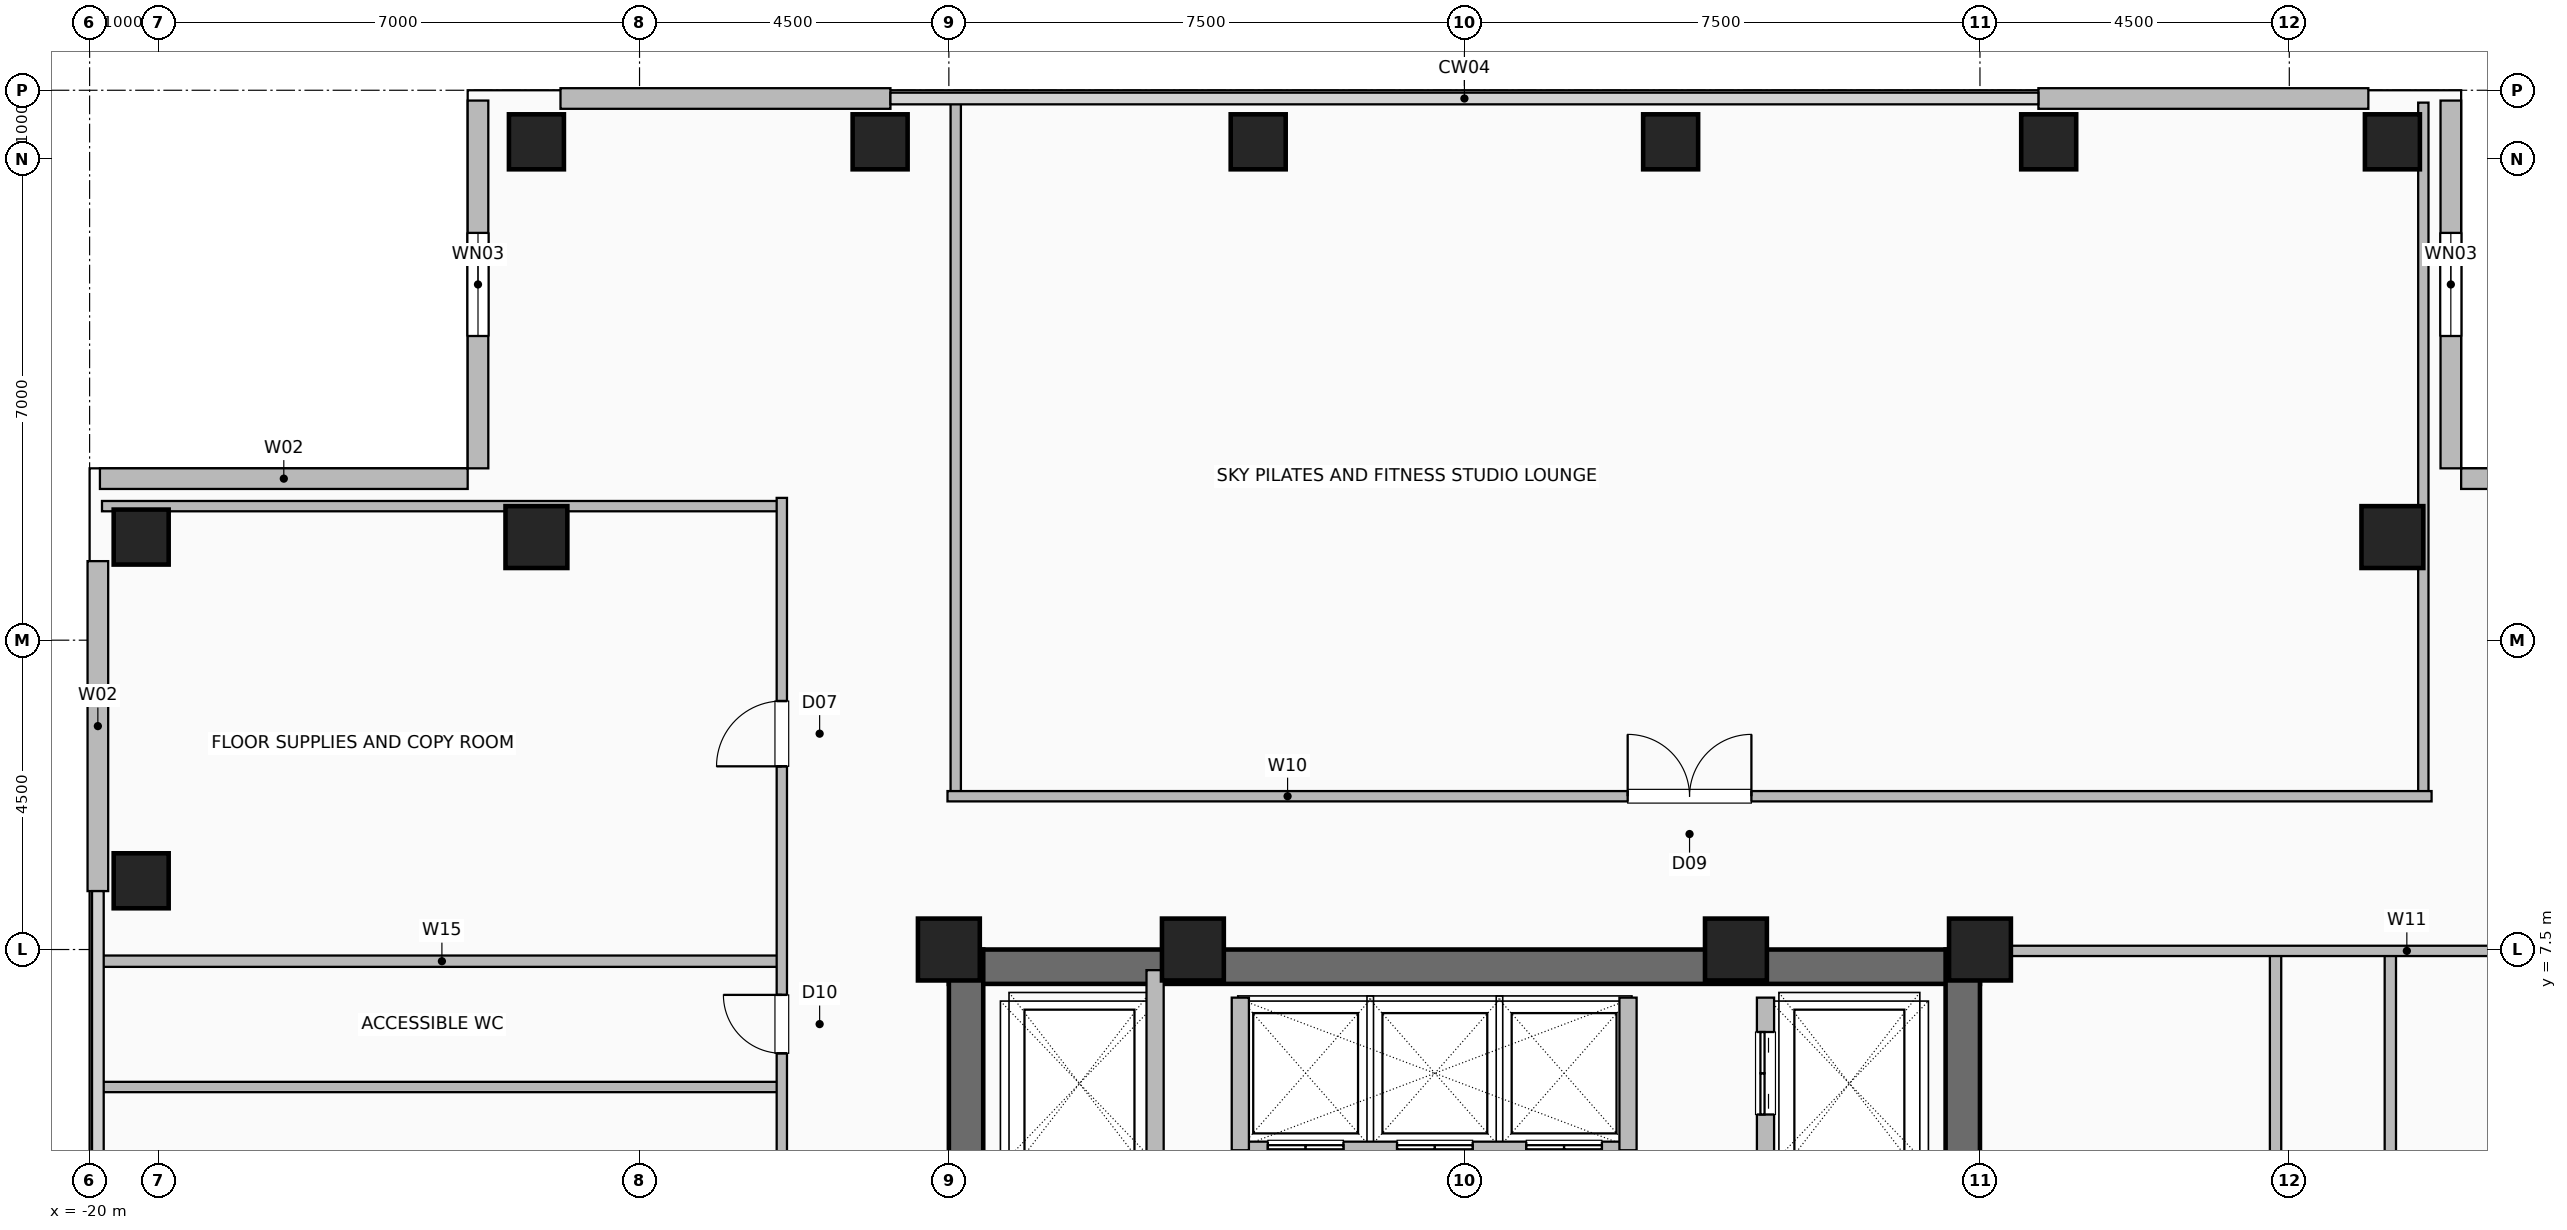
"""IFC4 building model, lengths in metres.
Left out: names, types, materials, properties, quantities, classifications, styles, units other than length and angle.
Written with IfcOpenShell. Run it as: python <this file> out.ifc"""

import sys

from ifc_helpers import new_model, si_unit, direction, frame, frame_2d, origin, origin_2d, place, context, subcontext, project, spatial, rectangle, hollow_rectangle, extrude, element, fill, save


model = new_model("IFC4")
c1 = context("Model", 3, precision=1e-05, world=origin(), true_north=direction((0.0, 1.0)))
c2 = subcontext(c1, "Body", "Model", "MODEL_VIEW")
j1 = project(units=[si_unit("LENGTHUNIT", "METRE"), si_unit("PLANEANGLEUNIT", "RADIAN")], contexts=[c1])
p1 = place(None, origin())
s1 = spatial("IfcSite", under=j1, at=p1, CompositionType="ELEMENT")
p2 = place(p1, origin())
s2 = spatial("IfcBuilding", under=s1, at=p2, CompositionType="ELEMENT")
p3 = place(p2, frame((0.0, 0.0, 202.2)))
s3 = spatial("IfcBuildingStorey", under=s2, at=p3, CompositionType="ELEMENT", Elevation=202.2)
for number, where, z_axis, x_axis in (
    (1, (7.5, 7.5, 0.0), (0.0, 0.0, 1.0), (1.0, 0.0, 0.0)),
    (2, (3.95, 7.5, 0.0), (0.0, 0.0, 1.0), (1.0, 0.0, 0.0)),
    (3, (-3.95, 7.5, 0.0), (0.0, 0.0, 1.0), (1.0, 0.0, 0.0)),
    (4, (-7.5, 7.5, 0.0), (0.0, 0.0, 1.0), (1.0, 0.0, 0.0)),
):
    element("IfcColumn", number, at=place(p3, frame(where, z_axis=z_axis, x_axis=x_axis)), inside=s3, PredefinedType="COLUMN", context=c2, shape_type="SweptSolid", body=[
        extrude(hollow_rectangle(XDim=0.9, YDim=0.9, WallThickness=0.045, at=origin_2d()), origin(), (0.0, 0.0, 1.0), 3.6),
    ])
for number, where, z_axis, x_axis in (
    (5, (-13.5, 19.25, 0.0), (0.0, 0.0, 1.0), (1.0, 0.0, 0.0)),
    (6, (-8.5, 19.25, 0.0), (0.0, 0.0, 1.0), (1.0, 0.0, 0.0)),
    (7, (-3.0, 19.25, 0.0), (0.0, 0.0, 1.0), (1.0, 0.0, 0.0)),
    (8, (3.0, 19.25, 0.0), (0.0, 0.0, 1.0), (1.0, 0.0, 0.0)),
    (9, (8.5, 19.25, 0.0), (0.0, 0.0, 1.0), (1.0, 0.0, 0.0)),
    (10, (-19.25, 8.5, 0.0), (0.0, 0.0, 1.0), (1.0, 0.0, 0.0)),
    (11, (13.5, 19.25, 0.0), (0.0, 0.0, 1.0), (1.0, 0.0, 0.0)),
    (12, (-19.25, 13.5, 0.0), (0.0, 0.0, 1.0), (1.0, 0.0, 0.0)),
):
    element("IfcColumn", number, at=place(p3, frame(where, z_axis=z_axis, x_axis=x_axis)), inside=s3, PredefinedType="COLUMN", context=c2, shape_type="SweptSolid", body=[
        extrude(hollow_rectangle(XDim=0.8, YDim=0.8, WallThickness=0.04, at=origin_2d()), origin(), (0.0, 0.0, 1.0), 3.6),
    ])
for number, where, z_axis, x_axis in (
    (13, (13.5, 13.5, 0.0), (0.0, 0.0, 1.0), (1.0, 0.0, 0.0)),
    (14, (-13.5, 13.5, 0.0), (0.0, 0.0, 1.0), (1.0, 0.0, 0.0)),
):
    element("IfcColumn", number, at=place(p3, frame(where, z_axis=z_axis, x_axis=x_axis)), inside=s3, PredefinedType="COLUMN", context=c2, shape_type="SweptSolid", body=[
        extrude(hollow_rectangle(XDim=0.9, YDim=0.9, WallThickness=0.045, at=origin_2d()), origin(), (0.0, 0.0, 1.0), 3.6),
    ])
for number, where, z_axis, x_axis in (
    (15, (-13.15, 19.88, 0.0), (0.0, 0.0, 1.0), (1.0, 0.0, 0.0)),
    (16, (8.35, 19.88, 0.0), (0.0, 0.0, 1.0), (1.0, 0.0, 0.0)),
    (17, (-19.88, 8.35, 0.0), (0.0, 0.0, 1.0), (0.0, 1.0, 0.0)),
):
    element("IfcWall", number, at=place(p3, frame(where, z_axis=z_axis, x_axis=x_axis)), inside=s3, PredefinedType="SOLIDWALL", context=c2, shape_type="SweptSolid", body=[
        extrude(rectangle(XDim=4.8, YDim=0.3, at=frame_2d((2.4, 0.0))), origin(), (0.0, 0.0, 1.0), 3.36),
    ])
p4 = place(p3, frame((14.35, 19.85, 0.0), z_axis=(0.0, 0.0, 1.0), x_axis=(0.0, -1.0, 0.0)))
e18 = element("IfcWall", 18, at=p4, inside=s3, PredefinedType="SOLIDWALL", context=c2, shape_type="SweptSolid", body=[
    extrude(rectangle(XDim=5.35, YDim=0.3, at=frame_2d((2.675, 0.0))), origin(), (0.0, 0.0, 1.0), 3.36),
])
p5 = place(p4, frame((1.925, 0.0, 0.9)))
e19 = element("IfcOpeningElement", 19, at=p5, cuts=e18, PredefinedType="OPENING", context=c2, shape_type="SweptSolid", body=[
    extrude(rectangle(XDim=1.5, YDim=1.8, at=frame_2d((0.75, 0.9))), frame((0.0, 0.16, 0.0), z_axis=(0.0, -1.0, 0.0), x_axis=(1.0, 0.0, 0.0)), (0.0, 0.0, 1.0), 0.32),
])
p6 = place(p3, frame((19.85, 14.35, 0.0), z_axis=(0.0, 0.0, 1.0), x_axis=(-1.0, 0.0, 0.0)))
e20 = element("IfcWall", 20, at=p6, inside=s3, PredefinedType="SOLIDWALL", context=c2, shape_type="SweptSolid", body=[
    extrude(rectangle(XDim=5.35, YDim=0.3, at=frame_2d((2.675, 0.0))), origin(), (0.0, 0.0, 1.0), 3.36),
])
p7 = place(p3, frame((-14.35, 19.85, 0.0), z_axis=(0.0, 0.0, 1.0), x_axis=(0.0, -1.0, 0.0)))
e21 = element("IfcWall", 21, at=p7, inside=s3, PredefinedType="SOLIDWALL", context=c2, shape_type="SweptSolid", body=[
    extrude(rectangle(XDim=5.35, YDim=0.3, at=frame_2d((2.675, 0.0))), origin(), (0.0, 0.0, 1.0), 3.36),
])
p8 = place(p7, frame((1.925, 0.0, 0.9)))
e22 = element("IfcOpeningElement", 22, at=p8, cuts=e21, PredefinedType="OPENING", context=c2, shape_type="SweptSolid", body=[
    extrude(rectangle(XDim=1.5, YDim=1.8, at=frame_2d((0.75, 0.9))), frame((0.0, 0.16, 0.0), z_axis=(0.0, -1.0, 0.0), x_axis=(1.0, 0.0, 0.0)), (0.0, 0.0, 1.0), 0.32),
])
p9 = place(p3, frame((-19.85, 14.35, 0.0), z_axis=(0.0, 0.0, 1.0), x_axis=(1.0, 0.0, 0.0)))
e23 = element("IfcWall", 23, at=p9, inside=s3, PredefinedType="SOLIDWALL", context=c2, shape_type="SweptSolid", body=[
    extrude(rectangle(XDim=5.35, YDim=0.3, at=frame_2d((2.675, 0.0))), origin(), (0.0, 0.0, 1.0), 3.36),
])
p10 = place(p3, frame((-7.5, 7.25, 0.0), z_axis=(0.0, 0.0, 1.0), x_axis=(1.0, 0.0, 0.0)))
e24 = element("IfcWall", 24, at=p10, inside=s3, PredefinedType="SHEAR", context=c2, shape_type="SweptSolid", body=[
    extrude(rectangle(XDim=15.0, YDim=0.5, at=frame_2d((7.5, 0.0))), origin(), (0.0, 0.0, 1.0), 3.36),
])
p11 = place(p3, frame((-7.25, -7.5, 0.0), z_axis=(0.0, 0.0, 1.0), x_axis=(0.0, 1.0, 0.0)))
e25 = element("IfcWall", 25, at=p11, inside=s3, PredefinedType="SHEAR", context=c2, shape_type="SweptSolid", body=[
    extrude(rectangle(XDim=15.0, YDim=0.5, at=frame_2d((7.5, 0.0))), origin(), (0.0, 0.0, 1.0), 3.36),
])
p12 = place(p11, frame((9.5, 0.0, 0.0)))
e26 = element("IfcOpeningElement", 26, at=p12, cuts=e25, PredefinedType="OPENING", context=c2, shape_type="SweptSolid", body=[
    extrude(rectangle(XDim=1.0, YDim=2.08, at=frame_2d((0.5, 1.04))), frame((0.0, 0.26, 0.0), z_axis=(0.0, -1.0, 0.0), x_axis=(1.0, 0.0, 0.0)), (0.0, 0.0, 1.0), 0.52),
])
p13 = place(p3, frame((7.25, -7.5, 0.0), z_axis=(0.0, 0.0, 1.0), x_axis=(0.0, 1.0, 0.0)))
e27 = element("IfcWall", 27, at=p13, inside=s3, PredefinedType="SHEAR", context=c2, shape_type="SweptSolid", body=[
    extrude(rectangle(XDim=15.0, YDim=0.5, at=frame_2d((7.5, 0.0))), origin(), (0.0, 0.0, 1.0), 3.36),
])
p14 = place(p3, frame((-3.26, 4.58, 0.0), z_axis=(0.0, 0.0, 1.0), x_axis=(1.0, 0.0, 0.0)))
e28 = element("IfcWall", 28, at=p14, inside=s3, PredefinedType="SHEAR", context=c2, shape_type="SweptSolid", body=[
    extrude(rectangle(XDim=5.64, YDim=0.25, at=frame_2d((2.82, 0.0))), origin(), (0.0, 0.0, 1.0), 3.36),
])
p15 = place(p14, frame((0.4, 0.0, 0.0)))
e29 = element("IfcOpeningElement", 29, at=p15, cuts=e28, PredefinedType="OPENING", context=c2, shape_type="SweptSolid", body=[
    extrude(rectangle(XDim=1.1, YDim=2.2, at=frame_2d((0.55, 1.1))), frame((0.0, 0.135, 0.0), z_axis=(0.0, -1.0, 0.0), x_axis=(1.0, 0.0, 0.0)), (0.0, 0.0, 1.0), 0.27),
])
p16 = place(p14, frame((2.28, 0.0, 0.0)))
e30 = element("IfcOpeningElement", 30, at=p16, cuts=e28, PredefinedType="OPENING", context=c2, shape_type="SweptSolid", body=[
    extrude(rectangle(XDim=1.1, YDim=2.2, at=frame_2d((0.55, 1.1))), frame((0.0, 0.135, 0.0), z_axis=(0.0, -1.0, 0.0), x_axis=(1.0, 0.0, 0.0)), (0.0, 0.0, 1.0), 0.27),
])
p17 = place(p14, frame((4.16, 0.0, 0.0)))
e31 = element("IfcOpeningElement", 31, at=p17, cuts=e28, PredefinedType="OPENING", context=c2, shape_type="SweptSolid", body=[
    extrude(rectangle(XDim=1.1, YDim=2.2, at=frame_2d((0.55, 1.1))), frame((0.0, 0.135, 0.0), z_axis=(0.0, -1.0, 0.0), x_axis=(1.0, 0.0, 0.0)), (0.0, 0.0, 1.0), 0.27),
])
for number, where, z_axis, x_axis in (
    (32, (-3.26, 4.58, 0.0), (0.0, 0.0, 1.0), (0.0, 1.0, 0.0)),
    (33, (2.38, 4.58, 0.0), (0.0, 0.0, 1.0), (0.0, 1.0, 0.0)),
):
    element("IfcWall", number, at=place(p3, frame(where, z_axis=z_axis, x_axis=x_axis)), inside=s3, PredefinedType="SHEAR", context=c2, shape_type="SweptSolid", body=[
        extrude(rectangle(XDim=2.22, YDim=0.25, at=frame_2d((1.11, 0.0))), origin(), (0.0, 0.0, 1.0), 3.36),
    ])
p18 = place(p3, frame((-4.5, 4.35, 0.0), z_axis=(0.0, 0.0, 1.0), x_axis=(0.0, 1.0, 0.0)))
e34 = element("IfcWall", 34, at=p18, inside=s3, PredefinedType="SHEAR", context=c2, shape_type="SweptSolid", body=[
    extrude(rectangle(XDim=2.85, YDim=0.25, at=frame_2d((1.425, 0.0))), origin(), (0.0, 0.0, 1.0), 3.36),
])
p19 = place(p3, frame((4.38, 4.3, 0.0), z_axis=(0.0, 0.0, 1.0), x_axis=(0.0, 1.0, 0.0)))
e35 = element("IfcWall", 35, at=p19, inside=s3, PredefinedType="SHEAR", context=c2, shape_type="SweptSolid", body=[
    extrude(rectangle(XDim=2.5, YDim=0.25, at=frame_2d((1.25, 0.0))), origin(), (0.0, 0.0, 1.0), 3.36),
])
p20 = place(p19, frame((0.8, 0.0, 0.0)))
e36 = element("IfcOpeningElement", 36, at=p20, cuts=e35, PredefinedType="OPENING", context=c2, shape_type="SweptSolid", body=[
    extrude(rectangle(XDim=1.2, YDim=2.2, at=frame_2d((0.6, 1.1))), frame((0.0, 0.135, 0.0), z_axis=(0.0, -1.0, 0.0), x_axis=(1.0, 0.0, 0.0)), (0.0, 0.0, 1.0), 0.27),
])
p21 = place(p3, frame((-19.82, 7.33, 0.0), z_axis=(0.0, 0.0, 1.0), x_axis=(1.0, 0.0, 0.0)))
e37 = element("IfcWall", 37, at=p21, inside=s3, PredefinedType="PLUMBINGWALL", context=c2, shape_type="SweptSolid", body=[
    extrude(rectangle(XDim=9.89, YDim=0.165, at=frame_2d((4.945, 0.0))), origin(), (0.0, 0.0, 1.0), 3.36),
])
for number, where, z_axis, x_axis in (
    (38, (-19.82, 5.5, 0.0), (0.0, 0.0, 1.0), (1.0, 0.0, 0.0)),
    (39, (-19.82, 13.95, 0.0), (0.0, 0.0, 1.0), (1.0, 0.0, 0.0)),
):
    element("IfcWall", number, at=place(p3, frame(where, z_axis=z_axis, x_axis=x_axis)), inside=s3, PredefinedType="PARTITIONING", context=c2, shape_type="SweptSolid", body=[
        extrude(rectangle(XDim=9.89, YDim=0.15, at=frame_2d((4.945, 0.0))), origin(), (0.0, 0.0, 1.0), 3.36),
    ])
p22 = place(p3, frame((-9.93, -7.52, 0.0), z_axis=(0.0, 0.0, 1.0), x_axis=(0.0, 1.0, 0.0)))
e40 = element("IfcWall", 40, at=p22, inside=s3, PredefinedType="PARTITIONING", context=c2, shape_type="SweptSolid", body=[
    extrude(rectangle(XDim=21.59, YDim=0.15, at=frame_2d((10.795, 0.0))), origin(), (0.0, 0.0, 1.0), 3.36),
])
p23 = place(p22, frame((2.595, 0.0, 0.0)))
e41 = element("IfcOpeningElement", 41, at=p23, cuts=e40, PredefinedType="OPENING", context=c2, shape_type="SweptSolid", body=[
    extrude(rectangle(XDim=0.95, YDim=2.06, at=frame_2d((0.475, 1.03))), frame((0.0, 0.085, 0.0), z_axis=(0.0, -1.0, 0.0), x_axis=(1.0, 0.0, 0.0)), (0.0, 0.0, 1.0), 0.17),
])
p24 = place(p22, frame((9.045, 0.0, 0.0)))
e42 = element("IfcOpeningElement", 42, at=p24, cuts=e40, PredefinedType="OPENING", context=c2, shape_type="SweptSolid", body=[
    extrude(rectangle(XDim=0.95, YDim=2.06, at=frame_2d((0.475, 1.03))), frame((0.0, 0.085, 0.0), z_axis=(0.0, -1.0, 0.0), x_axis=(1.0, 0.0, 0.0)), (0.0, 0.0, 1.0), 0.17),
])
p25 = place(p22, frame((13.51, 0.0, 0.0)))
e43 = element("IfcOpeningElement", 43, at=p25, cuts=e40, PredefinedType="OPENING", context=c2, shape_type="SweptSolid", body=[
    extrude(rectangle(XDim=0.85, YDim=2.05, at=frame_2d((0.425, 1.025))), frame((0.0, 0.085, 0.0), z_axis=(0.0, -1.0, 0.0), x_axis=(1.0, 0.0, 0.0)), (0.0, 0.0, 1.0), 0.17),
])
p26 = place(p22, frame((17.685, 0.0, 0.0)))
e44 = element("IfcOpeningElement", 44, at=p26, cuts=e40, PredefinedType="OPENING", context=c2, shape_type="SweptSolid", body=[
    extrude(rectangle(XDim=0.95, YDim=2.06, at=frame_2d((0.475, 1.03))), frame((0.0, 0.085, 0.0), z_axis=(0.0, -1.0, 0.0), x_axis=(1.0, 0.0, 0.0)), (0.0, 0.0, 1.0), 0.17),
])
for number, where, z_axis, x_axis in (
    (45, (-7.4, 9.73, 0.0), (0.0, 0.0, 1.0), (0.0, 1.0, 0.0)),
    (46, (13.95, 9.73, 0.0), (0.0, 0.0, 1.0), (0.0, 1.0, 0.0)),
):
    element("IfcWall", number, at=place(p3, frame(where, z_axis=z_axis, x_axis=x_axis)), inside=s3, PredefinedType="PARTITIONING", context=c2, shape_type="SweptSolid", body=[
        extrude(rectangle(XDim=10.09, YDim=0.15, at=frame_2d((5.045, 0.0))), origin(), (0.0, 0.0, 1.0), 3.36),
    ])
p27 = place(p3, frame((-7.52, 9.73, 0.0), z_axis=(0.0, 0.0, 1.0), x_axis=(1.0, 0.0, 0.0)))
e47 = element("IfcWall", 47, at=p27, inside=s3, PredefinedType="PARTITIONING", context=c2, shape_type="SweptSolid", body=[
    extrude(rectangle(XDim=21.59, YDim=0.15, at=frame_2d((10.795, 0.0))), origin(), (0.0, 0.0, 1.0), 3.36),
])
p28 = place(p27, frame((9.895, 0.0, 0.0)))
e48 = element("IfcOpeningElement", 48, at=p28, cuts=e47, PredefinedType="OPENING", context=c2, shape_type="SweptSolid", body=[
    extrude(rectangle(XDim=1.8, YDim=2.08, at=frame_2d((0.9, 1.04))), frame((0.0, 0.085, 0.0), z_axis=(0.0, -1.0, 0.0), x_axis=(1.0, 0.0, 0.0)), (0.0, 0.0, 1.0), 0.17),
])
for number, where, z_axis, x_axis in (
    (49, (13.47, -7.48, 0.0), (0.0, 0.0, 1.0), (0.0, 1.0, 0.0)),
    (50, (11.8, -7.48, 0.0), (0.0, 0.0, 1.0), (0.0, 1.0, 0.0)),
):
    element("IfcWall", number, at=place(p3, frame(where, z_axis=z_axis, x_axis=x_axis)), inside=s3, PredefinedType="PLUMBINGWALL", context=c2, shape_type="SweptSolid", body=[
        extrude(rectangle(XDim=14.9, YDim=0.165, at=frame_2d((7.45, 0.0))), origin(), (0.0, 0.0, 1.0), 3.36),
    ])
p29 = place(p3, frame((7.6, 7.48, 0.0), z_axis=(0.0, 0.0, 1.0), x_axis=(1.0, 0.0, 0.0)))
e51 = element("IfcWall", 51, at=p29, inside=s3, PredefinedType="PARTITIONING", context=c2, shape_type="SweptSolid", body=[
    extrude(rectangle(XDim=12.22, YDim=0.15, at=frame_2d((6.11, 0.0))), origin(), (0.0, 0.0, 1.0), 3.36),
])
p30 = place(p5, origin())
e52 = element("IfcWindow", 52, at=p30, inside=s3, PartitioningType="SINGLE_PANEL", PredefinedType="WINDOW", context=c2, shape_type="SweptSolid", body=[
    extrude(rectangle(XDim=1.5, YDim=1.8, at=frame_2d((0.75, 0.9))), frame((0.0, 0.03, 0.0), z_axis=(0.0, -1.0, 0.0), x_axis=(1.0, 0.0, 0.0)), (0.0, 0.0, 1.0), 0.06),
])
fill(e19, e52)
p31 = place(p8, origin())
e53 = element("IfcWindow", 53, at=p31, inside=s3, PartitioningType="SINGLE_PANEL", PredefinedType="WINDOW", context=c2, shape_type="SweptSolid", body=[
    extrude(rectangle(XDim=1.5, YDim=1.8, at=frame_2d((0.75, 0.9))), frame((0.0, 0.03, 0.0), z_axis=(0.0, -1.0, 0.0), x_axis=(1.0, 0.0, 0.0)), (0.0, 0.0, 1.0), 0.06),
])
fill(e22, e53)
p32 = place(p15, origin())
e54 = element("IfcDoor", 54, at=p32, inside=s3, OperationType="DOUBLE_DOOR_SLIDING", PredefinedType="DOOR", context=c2, shape_type="SweptSolid", body=[
    extrude(rectangle(XDim=1.1, YDim=2.2, at=frame_2d((0.55, 1.1))), frame((0.0, 0.025, 0.0), z_axis=(0.0, -1.0, 0.0), x_axis=(1.0, 0.0, 0.0)), (0.0, 0.0, 1.0), 0.05),
])
fill(e29, e54)
p33 = place(p16, origin())
e55 = element("IfcDoor", 55, at=p33, inside=s3, OperationType="DOUBLE_DOOR_SLIDING", PredefinedType="DOOR", context=c2, shape_type="SweptSolid", body=[
    extrude(rectangle(XDim=1.1, YDim=2.2, at=frame_2d((0.55, 1.1))), frame((0.0, 0.025, 0.0), z_axis=(0.0, -1.0, 0.0), x_axis=(1.0, 0.0, 0.0)), (0.0, 0.0, 1.0), 0.05),
])
fill(e30, e55)
p34 = place(p17, origin())
e56 = element("IfcDoor", 56, at=p34, inside=s3, OperationType="DOUBLE_DOOR_SLIDING", PredefinedType="DOOR", context=c2, shape_type="SweptSolid", body=[
    extrude(rectangle(XDim=1.1, YDim=2.2, at=frame_2d((0.55, 1.1))), frame((0.0, 0.025, 0.0), z_axis=(0.0, -1.0, 0.0), x_axis=(1.0, 0.0, 0.0)), (0.0, 0.0, 1.0), 0.05),
])
fill(e31, e56)
p35 = place(p20, origin())
e57 = element("IfcDoor", 57, at=p35, inside=s3, OperationType="DOUBLE_DOOR_SLIDING", PredefinedType="DOOR", context=c2, shape_type="SweptSolid", body=[
    extrude(rectangle(XDim=1.2, YDim=2.2, at=frame_2d((0.6, 1.1))), frame((0.0, 0.025, 0.0), z_axis=(0.0, -1.0, 0.0), x_axis=(1.0, 0.0, 0.0)), (0.0, 0.0, 1.0), 0.05),
])
fill(e36, e57)
p36 = place(p25, origin())
e58 = element("IfcDoor", 58, at=p36, inside=s3, OperationType="SINGLE_SWING_RIGHT", PredefinedType="DOOR", context=c2, shape_type="SweptSolid", body=[
    extrude(rectangle(XDim=0.85, YDim=2.05, at=frame_2d((0.425, 1.025))), frame((0.0, 0.025, 0.0), z_axis=(0.0, -1.0, 0.0), x_axis=(1.0, 0.0, 0.0)), (0.0, 0.0, 1.0), 0.05),
])
fill(e43, e58)
p37 = place(p26, origin())
e59 = element("IfcDoor", 59, at=p37, inside=s3, OperationType="SINGLE_SWING_LEFT", PredefinedType="DOOR", context=c2, shape_type="SweptSolid", body=[
    extrude(rectangle(XDim=0.95, YDim=2.06, at=frame_2d((0.475, 1.03))), frame((0.0, 0.025, 0.0), z_axis=(0.0, -1.0, 0.0), x_axis=(1.0, 0.0, 0.0)), (0.0, 0.0, 1.0), 0.05),
])
fill(e44, e59)
p38 = place(p28, origin())
e60 = element("IfcDoor", 60, at=p38, inside=s3, OperationType="DOUBLE_DOOR_SINGLE_SWING", PredefinedType="DOOR", context=c2, shape_type="SweptSolid", body=[
    extrude(rectangle(XDim=1.8, YDim=2.08, at=frame_2d((0.9, 1.04))), frame((0.0, 0.025, 0.0), z_axis=(0.0, -1.0, 0.0), x_axis=(1.0, 0.0, 0.0)), (0.0, 0.0, 1.0), 0.05),
])
fill(e48, e60)
save(model, sys.argv[1])
